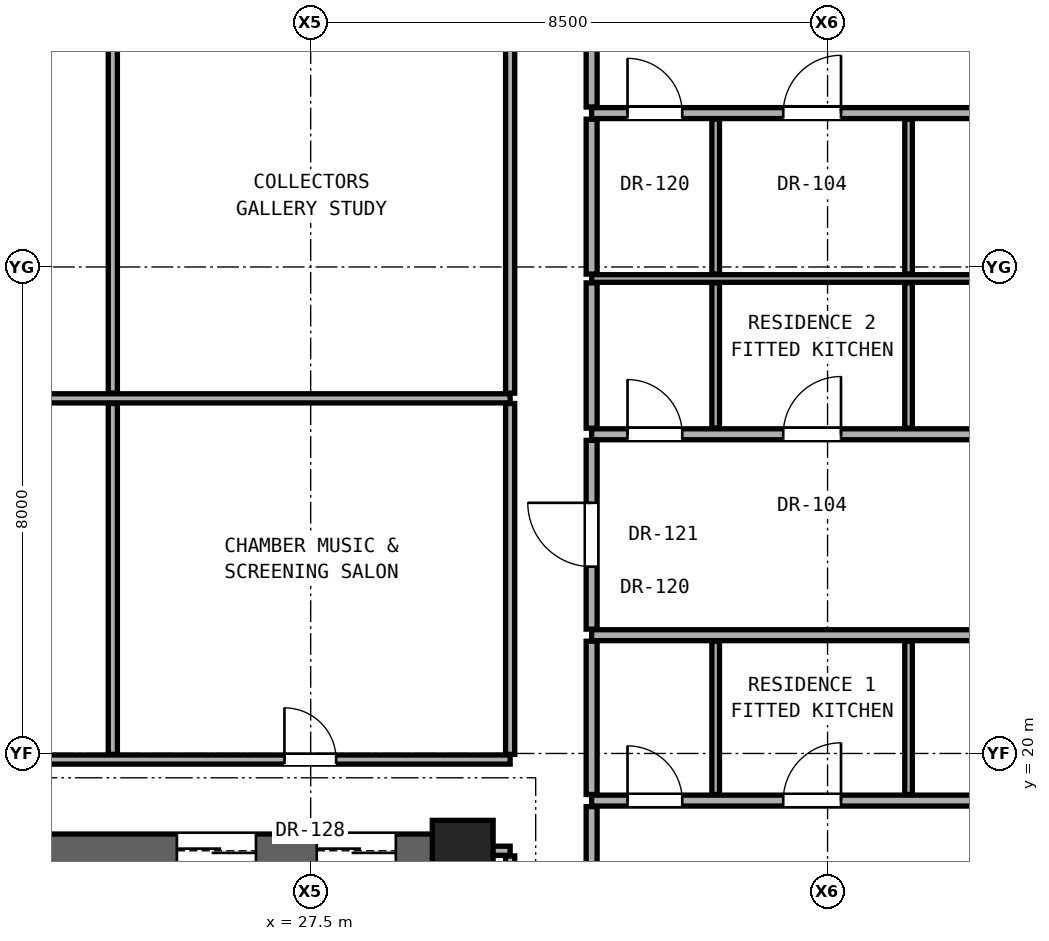
"""IFC4 building model, lengths in metres.
Left out: names, types, materials, properties, quantities, classifications, styles, units other than length and angle.
Written with IfcOpenShell. Run it as: python <this file> out.ifc"""

import sys

from ifc_helpers import new_model, si_unit, direction, frame, frame_2d, origin, origin_2d, place, context, subcontext, project, spatial, rectangle, extrude, element, fill, save


model = new_model("IFC4")
c1 = context("Model", 3, precision=1e-05, world=origin(), true_north=direction((0.0, 1.0)))
c2 = subcontext(c1, "Body", "Model", "MODEL_VIEW")
j1 = project(units=[si_unit("LENGTHUNIT", "METRE"), si_unit("PLANEANGLEUNIT", "RADIAN")], contexts=[c1])
p1 = place(None, origin())
s1 = spatial("IfcSite", under=j1, at=p1, CompositionType="ELEMENT")
p2 = place(p1, origin())
s2 = spatial("IfcBuilding", under=s1, at=p2, CompositionType="ELEMENT")
p3 = place(p2, frame((0.0, 0.0, 177.15)))
s3 = spatial("IfcBuildingStorey", under=s2, at=p3, CompositionType="ELEMENT", Elevation=177.15)
p4 = place(p3, frame((30.0, 18.4, 0.0), z_axis=(0.0, 0.0, 1.0), x_axis=(1.0, 0.0, 0.0)))
e1 = element("IfcColumn", 1, at=p4, inside=s3, PredefinedType="COLUMN", context=c2, shape_type="SweptSolid", body=[
    extrude(rectangle(XDim=1.0, YDim=1.0, at=origin_2d()), origin(), (0.0, 0.0, 1.0), 3.25),
])
p5 = place(p3, frame((30.0, 12.4, 0.0), z_axis=(0.0, 0.0, 1.0), x_axis=(0.0, 1.0, 0.0)))
e2 = element("IfcWall", 2, at=p5, inside=s3, PredefinedType="SHEAR", context=c2, shape_type="SweptSolid", body=[
    extrude(rectangle(XDim=6.0, YDim=0.55, at=frame_2d((3.0, 0.0))), origin(), (0.0, 0.0, 1.0), 3.05),
])
p6 = place(p3, frame((11.0, 18.4, 0.0), z_axis=(0.0, 0.0, 1.0), x_axis=(1.0, 0.0, 0.0)))
e3 = element("IfcWall", 3, at=p6, inside=s3, PredefinedType="SHEAR", context=c2, shape_type="SweptSolid", body=[
    extrude(rectangle(XDim=19.0, YDim=0.55, at=frame_2d((9.5, 0.0))), origin(), (0.0, 0.0, 1.0), 3.05),
])
p7 = place(p6, frame((4.175, 0.0, 0.0)))
e4 = element("IfcOpeningElement", 4, at=p7, cuts=e3, PredefinedType="OPENING", context=c2, shape_type="SweptSolid", body=[
    extrude(rectangle(XDim=1.2, YDim=2.25, at=frame_2d((0.6, 1.125))), frame((0.0, 0.285, 0.0), z_axis=(0.0, -1.0, 0.0), x_axis=(1.0, 0.0, 0.0)), (0.0, 0.0, 1.0), 0.57),
])
p8 = place(p6, frame((11.075, 0.0, 0.0)))
e5 = element("IfcOpeningElement", 5, at=p8, cuts=e3, PredefinedType="OPENING", context=c2, shape_type="SweptSolid", body=[
    extrude(rectangle(XDim=0.95, YDim=2.15, at=frame_2d((0.475, 1.075))), frame((0.0, 0.285, 0.0), z_axis=(0.0, -1.0, 0.0), x_axis=(1.0, 0.0, 0.0)), (0.0, 0.0, 1.0), 0.57),
])
p9 = place(p6, frame((14.3, 0.0, 0.0)))
e6 = element("IfcOpeningElement", 6, at=p9, cuts=e3, PredefinedType="OPENING", context=c2, shape_type="SweptSolid", body=[
    extrude(rectangle(XDim=1.3, YDim=2.3, at=frame_2d((0.65, 1.15))), frame((0.0, 0.285, 0.0), z_axis=(0.0, -1.0, 0.0), x_axis=(1.0, 0.0, 0.0)), (0.0, 0.0, 1.0), 0.57),
])
p10 = place(p6, frame((16.6, 0.0, 0.0)))
e7 = element("IfcOpeningElement", 7, at=p10, cuts=e3, PredefinedType="OPENING", context=c2, shape_type="SweptSolid", body=[
    extrude(rectangle(XDim=1.3, YDim=2.3, at=frame_2d((0.65, 1.15))), frame((0.0, 0.285, 0.0), z_axis=(0.0, -1.0, 0.0), x_axis=(1.0, 0.0, 0.0)), (0.0, 0.0, 1.0), 0.57),
])
p11 = place(p3, frame((30.27, 18.4, 0.0), z_axis=(0.0, 0.0, 1.0), x_axis=(1.0, 0.0, 0.0)))
e8 = element("IfcWall", 8, at=p11, inside=s3, PredefinedType="PARTITIONING", context=c2, shape_type="SweptSolid", body=[
    extrude(rectangle(XDim=0.51, YDim=0.15, at=frame_2d((0.255, 0.0))), origin(), (0.0, 0.0, 1.0), 2.442),
])
p12 = place(p3, frame((32.12, 19.225, 0.0), z_axis=(0.0, 0.0, 1.0), x_axis=(1.0, 0.0, 0.0)))
e9 = element("IfcWall", 9, at=p12, inside=s3, PredefinedType="PARTITIONING", context=c2, shape_type="SweptSolid", body=[
    extrude(rectangle(XDim=9.97, YDim=0.18, at=frame_2d((4.985, 0.0))), origin(), (0.0, 0.0, 1.0), 2.269),
])
p13 = place(p12, frame((7.396, 0.0, 0.0)))
e10 = element("IfcOpeningElement", 10, at=p13, cuts=e9, PredefinedType="OPENING", context=c2, shape_type="SweptSolid", body=[
    extrude(rectangle(XDim=0.95, YDim=2.15, at=frame_2d((0.475, 1.075))), frame((0.0, 0.1, 0.0), z_axis=(0.0, -1.0, 0.0), x_axis=(1.0, 0.0, 0.0)), (0.0, 0.0, 1.0), 0.2),
])
p14 = place(p12, frame((3.151, 0.0, 0.0)))
e11 = element("IfcOpeningElement", 11, at=p14, cuts=e9, PredefinedType="OPENING", context=c2, shape_type="SweptSolid", body=[
    extrude(rectangle(XDim=0.95, YDim=2.15, at=frame_2d((0.475, 1.075))), frame((0.0, 0.1, 0.0), z_axis=(0.0, -1.0, 0.0), x_axis=(1.0, 0.0, 0.0)), (0.0, 0.0, 1.0), 0.2),
])
p15 = place(p12, frame((0.59, 0.0, 0.0)))
e12 = element("IfcOpeningElement", 12, at=p15, cuts=e9, PredefinedType="OPENING", context=c2, shape_type="SweptSolid", body=[
    extrude(rectangle(XDim=0.9, YDim=2.1, at=frame_2d((0.45, 1.05))), frame((0.0, 0.1, 0.0), z_axis=(0.0, -1.0, 0.0), x_axis=(1.0, 0.0, 0.0)), (0.0, 0.0, 1.0), 0.2),
])
p16 = place(p3, frame((10.22, 19.9, 0.0), z_axis=(0.0, 0.0, 1.0), x_axis=(1.0, 0.0, 0.0)))
e13 = element("IfcWall", 13, at=p16, inside=s3, PredefinedType="PARTITIONING", context=c2, shape_type="SweptSolid", body=[
    extrude(rectangle(XDim=20.56, YDim=0.15, at=frame_2d((10.28, 0.0))), origin(), (0.0, 0.0, 1.0), 2.186),
])
p17 = place(p16, frame((1.66, 0.0, 0.0)))
e14 = element("IfcOpeningElement", 14, at=p17, cuts=e13, PredefinedType="OPENING", context=c2, shape_type="SweptSolid", body=[
    extrude(rectangle(XDim=0.9, YDim=2.1, at=frame_2d((0.45, 1.05))), frame((0.0, 0.085, 0.0), z_axis=(0.0, -1.0, 0.0), x_axis=(1.0, 0.0, 0.0)), (0.0, 0.0, 1.0), 0.17),
])
p18 = place(p16, frame((3.87, 0.0, 0.0)))
e15 = element("IfcOpeningElement", 15, at=p18, cuts=e13, PredefinedType="OPENING", context=c2, shape_type="SweptSolid", body=[
    extrude(rectangle(XDim=0.95, YDim=2.15, at=frame_2d((0.475, 1.075))), frame((0.0, 0.085, 0.0), z_axis=(0.0, -1.0, 0.0), x_axis=(1.0, 0.0, 0.0)), (0.0, 0.0, 1.0), 0.17),
])
p19 = place(p16, frame((9.443, 0.0, 0.0)))
e16 = element("IfcOpeningElement", 16, at=p19, cuts=e13, PredefinedType="OPENING", context=c2, shape_type="SweptSolid", body=[
    extrude(rectangle(XDim=0.85, YDim=2.01, at=frame_2d((0.425, 1.005))), frame((0.0, 0.085, 0.0), z_axis=(0.0, -1.0, 0.0), x_axis=(1.0, 0.0, 0.0)), (0.0, 0.0, 1.0), 0.17),
])
p20 = place(p16, frame((16.848, 0.0, 0.0)))
e17 = element("IfcOpeningElement", 17, at=p20, cuts=e13, PredefinedType="OPENING", context=c2, shape_type="SweptSolid", body=[
    extrude(rectangle(XDim=0.85, YDim=2.01, at=frame_2d((0.425, 1.005))), frame((0.0, 0.085, 0.0), z_axis=(0.0, -1.0, 0.0), x_axis=(1.0, 0.0, 0.0)), (0.0, 0.0, 1.0), 0.17),
])
p21 = place(p3, frame((32.12, 21.945, 0.0), z_axis=(0.0, 0.0, 1.0), x_axis=(1.0, 0.0, 0.0)))
e18 = element("IfcWall", 18, at=p21, inside=s3, PredefinedType="PARTITIONING", context=c2, shape_type="SweptSolid", body=[
    extrude(rectangle(XDim=9.97, YDim=0.18, at=frame_2d((4.985, 0.0))), origin(), (0.0, 0.0, 1.0), 2.269),
])
p22 = place(p3, frame((32.12, 25.249, 0.0), z_axis=(0.0, 0.0, 1.0), x_axis=(1.0, 0.0, 0.0)))
e19 = element("IfcWall", 19, at=p22, inside=s3, PredefinedType="PARTITIONING", context=c2, shape_type="SweptSolid", body=[
    extrude(rectangle(XDim=9.97, YDim=0.18, at=frame_2d((4.985, 0.0))), origin(), (0.0, 0.0, 1.0), 2.269),
])
p23 = place(p22, frame((7.396, 0.0, 0.0)))
e20 = element("IfcOpeningElement", 20, at=p23, cuts=e19, PredefinedType="OPENING", context=c2, shape_type="SweptSolid", body=[
    extrude(rectangle(XDim=0.95, YDim=2.15, at=frame_2d((0.475, 1.075))), frame((0.0, 0.1, 0.0), z_axis=(0.0, -1.0, 0.0), x_axis=(1.0, 0.0, 0.0)), (0.0, 0.0, 1.0), 0.2),
])
p24 = place(p22, frame((3.151, 0.0, 0.0)))
e21 = element("IfcOpeningElement", 21, at=p24, cuts=e19, PredefinedType="OPENING", context=c2, shape_type="SweptSolid", body=[
    extrude(rectangle(XDim=0.95, YDim=2.15, at=frame_2d((0.475, 1.075))), frame((0.0, 0.1, 0.0), z_axis=(0.0, -1.0, 0.0), x_axis=(1.0, 0.0, 0.0)), (0.0, 0.0, 1.0), 0.2),
])
p25 = place(p22, frame((0.59, 0.0, 0.0)))
e22 = element("IfcOpeningElement", 22, at=p25, cuts=e19, PredefinedType="OPENING", context=c2, shape_type="SweptSolid", body=[
    extrude(rectangle(XDim=0.9, YDim=2.1, at=frame_2d((0.45, 1.05))), frame((0.0, 0.1, 0.0), z_axis=(0.0, -1.0, 0.0), x_axis=(1.0, 0.0, 0.0)), (0.0, 0.0, 1.0), 0.2),
])
p26 = place(p3, frame((15.93, 25.84, 0.0), z_axis=(0.0, 0.0, 1.0), x_axis=(1.0, 0.0, 0.0)))
e23 = element("IfcWall", 23, at=p26, inside=s3, PredefinedType="PARTITIONING", context=c2, shape_type="SweptSolid", body=[
    extrude(rectangle(XDim=14.85, YDim=0.15, at=frame_2d((7.425, 0.0))), origin(), (0.0, 0.0, 1.0), 2.186),
])
p27 = place(p3, frame((32.12, 27.811, 0.0), z_axis=(0.0, 0.0, 1.0), x_axis=(1.0, 0.0, 0.0)))
e24 = element("IfcWall", 24, at=p27, inside=s3, PredefinedType="PARTITIONING", context=c2, shape_type="SweptSolid", body=[
    extrude(rectangle(XDim=9.97, YDim=0.125, at=frame_2d((4.985, 0.0))), origin(), (0.0, 0.0, 1.0), 2.269),
])
p28 = place(p3, frame((32.12, 30.531, 0.0), z_axis=(0.0, 0.0, 1.0), x_axis=(1.0, 0.0, 0.0)))
e25 = element("IfcWall", 25, at=p28, inside=s3, PredefinedType="PARTITIONING", context=c2, shape_type="SweptSolid", body=[
    extrude(rectangle(XDim=9.97, YDim=0.18, at=frame_2d((4.985, 0.0))), origin(), (0.0, 0.0, 1.0), 2.269),
])
p29 = place(p28, frame((7.396, 0.0, 0.0)))
e26 = element("IfcOpeningElement", 26, at=p29, cuts=e25, PredefinedType="OPENING", context=c2, shape_type="SweptSolid", body=[
    extrude(rectangle(XDim=0.95, YDim=2.15, at=frame_2d((0.475, 1.075))), frame((0.0, 0.1, 0.0), z_axis=(0.0, -1.0, 0.0), x_axis=(1.0, 0.0, 0.0)), (0.0, 0.0, 1.0), 0.2),
])
p30 = place(p28, frame((3.151, 0.0, 0.0)))
e27 = element("IfcOpeningElement", 27, at=p30, cuts=e25, PredefinedType="OPENING", context=c2, shape_type="SweptSolid", body=[
    extrude(rectangle(XDim=0.95, YDim=2.15, at=frame_2d((0.475, 1.075))), frame((0.0, 0.1, 0.0), z_axis=(0.0, -1.0, 0.0), x_axis=(1.0, 0.0, 0.0)), (0.0, 0.0, 1.0), 0.2),
])
p31 = place(p28, frame((0.59, 0.0, 0.0)))
e28 = element("IfcOpeningElement", 28, at=p31, cuts=e25, PredefinedType="OPENING", context=c2, shape_type="SweptSolid", body=[
    extrude(rectangle(XDim=0.9, YDim=2.1, at=frame_2d((0.45, 1.05))), frame((0.0, 0.1, 0.0), z_axis=(0.0, -1.0, 0.0), x_axis=(1.0, 0.0, 0.0)), (0.0, 0.0, 1.0), 0.2),
])
p32 = place(p3, frame((24.246, 19.985, 0.0), z_axis=(0.0, 0.0, 1.0), x_axis=(0.0, 1.0, 0.0)))
e29 = element("IfcWall", 29, at=p32, inside=s3, PredefinedType="PARTITIONING", context=c2, shape_type="SweptSolid", body=[
    extrude(rectangle(XDim=5.77, YDim=0.15, at=frame_2d((2.885, 0.0))), origin(), (0.0, 0.0, 1.0), 2.186),
])
p33 = place(p3, frame((24.246, 25.925, 0.0), z_axis=(0.0, 0.0, 1.0), x_axis=(0.0, 1.0, 0.0)))
e30 = element("IfcWall", 30, at=p33, inside=s3, PredefinedType="PARTITIONING", context=c2, shape_type="SweptSolid", body=[
    extrude(rectangle(XDim=7.09, YDim=0.15, at=frame_2d((3.545, 0.0))), origin(), (0.0, 0.0, 1.0), 2.186),
])
p34 = place(p3, frame((30.78, 12.335, 0.0), z_axis=(0.0, 0.0, 1.0), x_axis=(0.0, 1.0, 0.0)))
e31 = element("IfcWall", 31, at=p34, inside=s3, PredefinedType="PARTITIONING", context=c2, shape_type="SweptSolid", body=[
    extrude(rectangle(XDim=5.98, YDim=0.15, at=frame_2d((2.99, 0.0))), origin(), (0.0, 0.0, 1.0), 2.442),
])
p35 = place(p3, frame((30.78, 19.985, 0.0), z_axis=(0.0, 0.0, 1.0), x_axis=(0.0, 1.0, 0.0)))
e32 = element("IfcWall", 32, at=p35, inside=s3, PredefinedType="PARTITIONING", context=c2, shape_type="SweptSolid", body=[
    extrude(rectangle(XDim=5.77, YDim=0.15, at=frame_2d((2.885, 0.0))), origin(), (0.0, 0.0, 1.0), 2.346),
])
p36 = place(p3, frame((30.78, 25.925, 0.0), z_axis=(0.0, 0.0, 1.0), x_axis=(0.0, 1.0, 0.0)))
e33 = element("IfcWall", 33, at=p36, inside=s3, PredefinedType="PARTITIONING", context=c2, shape_type="SweptSolid", body=[
    extrude(rectangle(XDim=7.09, YDim=0.15, at=frame_2d((3.545, 0.0))), origin(), (0.0, 0.0, 1.0), 2.346),
])
p37 = place(p3, frame((32.12, 14.489, 0.0), z_axis=(0.0, 0.0, 1.0), x_axis=(0.0, 1.0, 0.0)))
e34 = element("IfcWall", 34, at=p37, inside=s3, PredefinedType="PARTITIONING", context=c2, shape_type="SweptSolid", body=[
    extrude(rectangle(XDim=4.636, YDim=0.18, at=frame_2d((2.318, 0.0))), origin(), (0.0, 0.0, 1.0), 2.442),
])
p38 = place(p37, frame((2.093, 0.0, 0.0)))
e35 = element("IfcOpeningElement", 35, at=p38, cuts=e34, PredefinedType="OPENING", context=c2, shape_type="SweptSolid", body=[
    extrude(rectangle(XDim=1.05, YDim=2.2, at=frame_2d((0.525, 1.1))), frame((0.0, 0.1, 0.0), z_axis=(0.0, -1.0, 0.0), x_axis=(1.0, 0.0, 0.0)), (0.0, 0.0, 1.0), 0.2),
])
p39 = place(p3, frame((32.12, 19.325, 0.0), z_axis=(0.0, 0.0, 1.0), x_axis=(0.0, 1.0, 0.0)))
e36 = element("IfcWall", 36, at=p39, inside=s3, PredefinedType="PARTITIONING", context=c2, shape_type="SweptSolid", body=[
    extrude(rectangle(XDim=2.52, YDim=0.18, at=frame_2d((1.26, 0.0))), origin(), (0.0, 0.0, 1.0), 3.05),
])
p40 = place(p3, frame((32.12, 22.045, 0.0), z_axis=(0.0, 0.0, 1.0), x_axis=(0.0, 1.0, 0.0)))
e37 = element("IfcWall", 37, at=p40, inside=s3, PredefinedType="PARTITIONING", context=c2, shape_type="SweptSolid", body=[
    extrude(rectangle(XDim=3.104, YDim=0.18, at=frame_2d((1.552, 0.0))), origin(), (0.0, 0.0, 1.0), 2.346),
])
p41 = place(p40, frame((1.027, 0.0, 0.0)))
e38 = element("IfcOpeningElement", 38, at=p41, cuts=e37, PredefinedType="OPENING", context=c2, shape_type="SweptSolid", body=[
    extrude(rectangle(XDim=1.05, YDim=2.2, at=frame_2d((0.525, 1.1))), frame((0.0, 0.1, 0.0), z_axis=(0.0, -1.0, 0.0), x_axis=(1.0, 0.0, 0.0)), (0.0, 0.0, 1.0), 0.2),
])
p42 = place(p3, frame((32.12, 25.349, 0.0), z_axis=(0.0, 0.0, 1.0), x_axis=(0.0, 1.0, 0.0)))
e39 = element("IfcWall", 39, at=p42, inside=s3, PredefinedType="PARTITIONING", context=c2, shape_type="SweptSolid", body=[
    extrude(rectangle(XDim=2.389, YDim=0.18, at=frame_2d((1.195, 0.0))), origin(), (0.0, 0.0, 1.0), 3.05),
])
p43 = place(p3, frame((32.12, 27.884, 0.0), z_axis=(0.0, 0.0, 1.0), x_axis=(0.0, 1.0, 0.0)))
e40 = element("IfcWall", 40, at=p43, inside=s3, PredefinedType="PARTITIONING", context=c2, shape_type="SweptSolid", body=[
    extrude(rectangle(XDim=2.547, YDim=0.18, at=frame_2d((1.274, 0.0))), origin(), (0.0, 0.0, 1.0), 3.05),
])
p44 = place(p3, frame((32.12, 30.631, 0.0), z_axis=(0.0, 0.0, 1.0), x_axis=(0.0, 1.0, 0.0)))
e41 = element("IfcWall", 41, at=p44, inside=s3, PredefinedType="PARTITIONING", context=c2, shape_type="SweptSolid", body=[
    extrude(rectangle(XDim=3.513, YDim=0.18, at=frame_2d((1.756, 0.0))), origin(), (0.0, 0.0, 1.0), 2.346),
])
p45 = place(p44, frame((1.231, 0.0, 0.0)))
e42 = element("IfcOpeningElement", 42, at=p45, cuts=e41, PredefinedType="OPENING", context=c2, shape_type="SweptSolid", body=[
    extrude(rectangle(XDim=1.05, YDim=2.2, at=frame_2d((0.525, 1.1))), frame((0.0, 0.1, 0.0), z_axis=(0.0, -1.0, 0.0), x_axis=(1.0, 0.0, 0.0)), (0.0, 0.0, 1.0), 0.2),
])
p46 = place(p3, frame((34.16, 19.325, 0.0), z_axis=(0.0, 0.0, 1.0), x_axis=(0.0, 1.0, 0.0)))
e43 = element("IfcWall", 43, at=p46, inside=s3, PredefinedType="PARTITIONING", context=c2, shape_type="SweptSolid", body=[
    extrude(rectangle(XDim=2.52, YDim=0.125, at=frame_2d((1.26, 0.0))), origin(), (0.0, 0.0, 1.0), 3.05),
])
p47 = place(p3, frame((34.16, 25.349, 0.0), z_axis=(0.0, 0.0, 1.0), x_axis=(0.0, 1.0, 0.0)))
e44 = element("IfcWall", 44, at=p47, inside=s3, PredefinedType="PARTITIONING", context=c2, shape_type="SweptSolid", body=[
    extrude(rectangle(XDim=2.389, YDim=0.125, at=frame_2d((1.195, 0.0))), origin(), (0.0, 0.0, 1.0), 3.05),
])
p48 = place(p3, frame((34.16, 27.884, 0.0), z_axis=(0.0, 0.0, 1.0), x_axis=(0.0, 1.0, 0.0)))
e45 = element("IfcWall", 45, at=p48, inside=s3, PredefinedType="PARTITIONING", context=c2, shape_type="SweptSolid", body=[
    extrude(rectangle(XDim=2.547, YDim=0.125, at=frame_2d((1.274, 0.0))), origin(), (0.0, 0.0, 1.0), 3.05),
])
p49 = place(p3, frame((37.332, 19.325, 0.0), z_axis=(0.0, 0.0, 1.0), x_axis=(0.0, 1.0, 0.0)))
e46 = element("IfcWall", 46, at=p49, inside=s3, PredefinedType="PARTITIONING", context=c2, shape_type="SweptSolid", body=[
    extrude(rectangle(XDim=2.52, YDim=0.125, at=frame_2d((1.26, 0.0))), origin(), (0.0, 0.0, 1.0), 3.05),
])
p50 = place(p3, frame((37.332, 25.349, 0.0), z_axis=(0.0, 0.0, 1.0), x_axis=(0.0, 1.0, 0.0)))
e47 = element("IfcWall", 47, at=p50, inside=s3, PredefinedType="PARTITIONING", context=c2, shape_type="SweptSolid", body=[
    extrude(rectangle(XDim=2.389, YDim=0.125, at=frame_2d((1.195, 0.0))), origin(), (0.0, 0.0, 1.0), 3.05),
])
p51 = place(p3, frame((37.332, 27.884, 0.0), z_axis=(0.0, 0.0, 1.0), x_axis=(0.0, 1.0, 0.0)))
e48 = element("IfcWall", 48, at=p51, inside=s3, PredefinedType="PARTITIONING", context=c2, shape_type="SweptSolid", body=[
    extrude(rectangle(XDim=2.547, YDim=0.125, at=frame_2d((1.274, 0.0))), origin(), (0.0, 0.0, 1.0), 3.05),
])
p52 = place(p14, origin())
e49 = element("IfcDoor", 49, at=p52, inside=s3, OperationType="SINGLE_SWING_RIGHT", PredefinedType="DOOR", context=c2, shape_type="SweptSolid", body=[
    extrude(rectangle(XDim=0.95, YDim=2.15, at=frame_2d((0.475, 1.075))), frame((0.0, 0.025, 0.0), z_axis=(0.0, -1.0, 0.0), x_axis=(1.0, 0.0, 0.0)), (0.0, 0.0, 1.0), 0.05),
])
fill(e11, e49)
p53 = place(p15, origin())
e50 = element("IfcDoor", 50, at=p53, inside=s3, OperationType="SINGLE_SWING_LEFT", PredefinedType="DOOR", context=c2, shape_type="SweptSolid", body=[
    extrude(rectangle(XDim=0.9, YDim=2.1, at=frame_2d((0.45, 1.05))), frame((0.0, 0.025, 0.0), z_axis=(0.0, -1.0, 0.0), x_axis=(1.0, 0.0, 0.0)), (0.0, 0.0, 1.0), 0.05),
])
fill(e12, e50)
p54 = place(p41, origin())
e51 = element("IfcDoor", 51, at=p54, inside=s3, OperationType="SINGLE_SWING_RIGHT", PredefinedType="DOOR", context=c2, shape_type="SweptSolid", body=[
    extrude(rectangle(XDim=1.05, YDim=2.2, at=frame_2d((0.525, 1.1))), frame((0.0, 0.025, 0.0), z_axis=(0.0, -1.0, 0.0), x_axis=(1.0, 0.0, 0.0)), (0.0, 0.0, 1.0), 0.05),
])
fill(e38, e51)
p55 = place(p24, origin())
e52 = element("IfcDoor", 52, at=p55, inside=s3, OperationType="SINGLE_SWING_RIGHT", PredefinedType="DOOR", context=c2, shape_type="SweptSolid", body=[
    extrude(rectangle(XDim=0.95, YDim=2.15, at=frame_2d((0.475, 1.075))), frame((0.0, 0.025, 0.0), z_axis=(0.0, -1.0, 0.0), x_axis=(1.0, 0.0, 0.0)), (0.0, 0.0, 1.0), 0.05),
])
fill(e21, e52)
p56 = place(p25, origin())
e53 = element("IfcDoor", 53, at=p56, inside=s3, OperationType="SINGLE_SWING_LEFT", PredefinedType="DOOR", context=c2, shape_type="SweptSolid", body=[
    extrude(rectangle(XDim=0.9, YDim=2.1, at=frame_2d((0.45, 1.05))), frame((0.0, 0.025, 0.0), z_axis=(0.0, -1.0, 0.0), x_axis=(1.0, 0.0, 0.0)), (0.0, 0.0, 1.0), 0.05),
])
fill(e22, e53)
p57 = place(p30, origin())
e54 = element("IfcDoor", 54, at=p57, inside=s3, OperationType="SINGLE_SWING_RIGHT", PredefinedType="DOOR", context=c2, shape_type="SweptSolid", body=[
    extrude(rectangle(XDim=0.95, YDim=2.15, at=frame_2d((0.475, 1.075))), frame((0.0, 0.025, 0.0), z_axis=(0.0, -1.0, 0.0), x_axis=(1.0, 0.0, 0.0)), (0.0, 0.0, 1.0), 0.05),
])
fill(e27, e54)
p58 = place(p31, origin())
e55 = element("IfcDoor", 55, at=p58, inside=s3, OperationType="SINGLE_SWING_LEFT", PredefinedType="DOOR", context=c2, shape_type="SweptSolid", body=[
    extrude(rectangle(XDim=0.9, YDim=2.1, at=frame_2d((0.45, 1.05))), frame((0.0, 0.025, 0.0), z_axis=(0.0, -1.0, 0.0), x_axis=(1.0, 0.0, 0.0)), (0.0, 0.0, 1.0), 0.05),
])
fill(e28, e55)
p59 = place(p20, origin())
e56 = element("IfcDoor", 56, at=p59, inside=s3, OperationType="SINGLE_SWING_LEFT", PredefinedType="DOOR", context=c2, shape_type="SweptSolid", body=[
    extrude(rectangle(XDim=0.85, YDim=2.01, at=frame_2d((0.425, 1.005))), frame((0.0, 0.025, 0.0), z_axis=(0.0, -1.0, 0.0), x_axis=(1.0, 0.0, 0.0)), (0.0, 0.0, 1.0), 0.05),
])
fill(e17, e56)
p60 = place(p9, origin())
e57 = element("IfcDoor", 57, at=p60, inside=s3, OperationType="DOUBLE_DOOR_SLIDING", PredefinedType="DOOR", context=c2, shape_type="SweptSolid", body=[
    extrude(rectangle(XDim=1.3, YDim=2.3, at=frame_2d((0.65, 1.15))), frame((0.0, 0.025, 0.0), z_axis=(0.0, -1.0, 0.0), x_axis=(1.0, 0.0, 0.0)), (0.0, 0.0, 1.0), 0.05),
])
fill(e6, e57)
p61 = place(p10, origin())
e58 = element("IfcDoor", 58, at=p61, inside=s3, OperationType="DOUBLE_DOOR_SLIDING", PredefinedType="DOOR", context=c2, shape_type="SweptSolid", body=[
    extrude(rectangle(XDim=1.3, YDim=2.3, at=frame_2d((0.65, 1.15))), frame((0.0, 0.025, 0.0), z_axis=(0.0, -1.0, 0.0), x_axis=(1.0, 0.0, 0.0)), (0.0, 0.0, 1.0), 0.05),
])
fill(e7, e58)
save(model, sys.argv[1])
